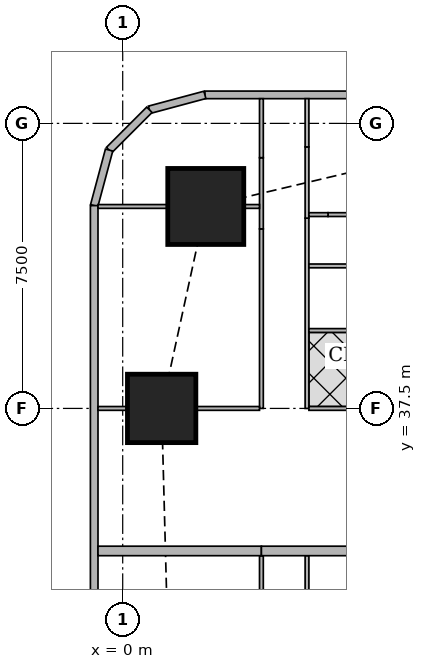
"""IFC4 building model, lengths in metres.
Left out: names, types, materials, properties, quantities, classifications, styles, units other than length and angle.
Written with IfcOpenShell. Run it as: python <this file> out.ifc"""

import sys

from ifc_helpers import new_model, si_unit, direction, frame, frame_2d, origin, origin_2d, place, context, subcontext, project, spatial, rectangle, extrude, element, fill, save


model = new_model("IFC4")
c1 = context("Model", 3, precision=1e-05, world=origin(), true_north=direction((0.0, 1.0)))
c2 = subcontext(c1, "Body", "Model", "MODEL_VIEW")
j1 = project(units=[si_unit("LENGTHUNIT", "METRE"), si_unit("PLANEANGLEUNIT", "RADIAN")], contexts=[c1])
p1 = place(None, origin())
s1 = spatial("IfcSite", under=j1, at=p1, CompositionType="ELEMENT")
p2 = place(p1, origin())
s2 = spatial("IfcBuilding", under=s1, at=p2, CompositionType="ELEMENT")
p3 = place(p2, frame((0.0, 0.0, 180.8)))
s3 = spatial("IfcBuildingStorey", under=s2, at=p3, CompositionType="ELEMENT", Elevation=180.8)
p4 = place(p3, frame((1.025, 37.5, 0.0), z_axis=(0.0, 0.0, 1.0), x_axis=(1.0, 0.0, 0.0)))
e1 = element("IfcColumn", 1, at=p4, inside=s3, PredefinedType="COLUMN", context=c2, shape_type="SweptSolid", body=[
    extrude(rectangle(XDim=1.8, YDim=1.8, at=origin_2d()), origin(), (0.0, 0.0, 1.0), 3.75),
])
p5 = place(p3, frame((2.186, 42.814, 0.0), z_axis=(0.0, 0.0, 1.0), x_axis=(1.0, 0.0, 0.0)))
e2 = element("IfcColumn", 2, at=p5, inside=s3, PredefinedType="COLUMN", context=c2, shape_type="SweptSolid", body=[
    extrude(rectangle(XDim=2.0, YDim=2.0, at=origin_2d()), origin(), (0.0, 0.0, 1.0), 3.75),
])
p6 = place(p3, frame((40.106, 45.75, 0.0), z_axis=(0.0, 0.0, 1.0), x_axis=(-1.0, 0.0, 0.0)))
e3 = element("IfcWall", 3, at=p6, inside=s3, PredefinedType="SOLIDWALL", context=c2, shape_type="SweptSolid", body=[
    extrude(rectangle(XDim=37.943, YDim=0.2, at=frame_2d((18.971, 0.0))), origin(), (0.0, 0.0, 1.0), 3.5),
])
p7 = place(p6, frame((8.606, 0.0, 0.9)))
e4 = element("IfcOpeningElement", 4, at=p7, cuts=e3, PredefinedType="OPENING", context=c2, shape_type="SweptSolid", body=[
    extrude(rectangle(XDim=1.8, YDim=1.5, at=frame_2d((0.9, 0.75))), frame((0.0, 0.11, 0.0), z_axis=(0.0, -1.0, 0.0), x_axis=(1.0, 0.0, 0.0)), (0.0, 0.0, 1.0), 0.22),
])
p8 = place(p6, frame((12.206, 0.0, 0.9)))
e5 = element("IfcOpeningElement", 5, at=p8, cuts=e3, PredefinedType="OPENING", context=c2, shape_type="SweptSolid", body=[
    extrude(rectangle(XDim=1.8, YDim=1.5, at=frame_2d((0.9, 0.75))), frame((0.0, 0.11, 0.0), z_axis=(0.0, -1.0, 0.0), x_axis=(1.0, 0.0, 0.0)), (0.0, 0.0, 1.0), 0.22),
])
p9 = place(p6, frame((15.806, 0.0, 0.9)))
e6 = element("IfcOpeningElement", 6, at=p9, cuts=e3, PredefinedType="OPENING", context=c2, shape_type="SweptSolid", body=[
    extrude(rectangle(XDim=1.8, YDim=1.5, at=frame_2d((0.9, 0.75))), frame((0.0, 0.11, 0.0), z_axis=(0.0, -1.0, 0.0), x_axis=(1.0, 0.0, 0.0)), (0.0, 0.0, 1.0), 0.22),
])
p10 = place(p6, frame((19.406, 0.0, 0.9)))
e7 = element("IfcOpeningElement", 7, at=p10, cuts=e3, PredefinedType="OPENING", context=c2, shape_type="SweptSolid", body=[
    extrude(rectangle(XDim=1.8, YDim=1.5, at=frame_2d((0.9, 0.75))), frame((0.0, 0.11, 0.0), z_axis=(0.0, -1.0, 0.0), x_axis=(1.0, 0.0, 0.0)), (0.0, 0.0, 1.0), 0.22),
])
p11 = place(p6, frame((23.006, 0.0, 0.9)))
e8 = element("IfcOpeningElement", 8, at=p11, cuts=e3, PredefinedType="OPENING", context=c2, shape_type="SweptSolid", body=[
    extrude(rectangle(XDim=1.8, YDim=1.5, at=frame_2d((0.9, 0.75))), frame((0.0, 0.11, 0.0), z_axis=(0.0, -1.0, 0.0), x_axis=(1.0, 0.0, 0.0)), (0.0, 0.0, 1.0), 0.22),
])
p12 = place(p6, frame((26.606, 0.0, 0.9)))
e9 = element("IfcOpeningElement", 9, at=p12, cuts=e3, PredefinedType="OPENING", context=c2, shape_type="SweptSolid", body=[
    extrude(rectangle(XDim=1.8, YDim=1.5, at=frame_2d((0.9, 0.75))), frame((0.0, 0.11, 0.0), z_axis=(0.0, -1.0, 0.0), x_axis=(1.0, 0.0, 0.0)), (0.0, 0.0, 1.0), 0.22),
])
p13 = place(p3, frame((2.163, 45.75, 0.0), z_axis=(0.0, 0.0, 1.0), x_axis=(-0.965832000415, -0.259168954497, 0.0)))
e10 = element("IfcWall", 10, at=p13, inside=s3, PredefinedType="SOLIDWALL", context=c2, shape_type="SweptSolid", body=[
    extrude(rectangle(XDim=1.513, YDim=0.2, at=frame_2d((0.756, 0.0))), origin(), (0.0, 0.0, 1.0), 3.5),
])
p14 = place(p3, frame((0.702, 45.358, 0.0), z_axis=(0.0, 0.0, 1.0), x_axis=(-0.707106781187, -0.707106781187, 0.0)))
e11 = element("IfcWall", 11, at=p14, inside=s3, PredefinedType="SOLIDWALL", context=c2, shape_type="SweptSolid", body=[
    extrude(rectangle(XDim=1.499, YDim=0.2, at=frame_2d((0.75, 0.0))), origin(), (0.0, 0.0, 1.0), 3.5),
])
p15 = place(p3, frame((-0.358, 44.298, 0.0), z_axis=(0.0, 0.0, 1.0), x_axis=(-0.259168954497, -0.965832000415, 0.0)))
e12 = element("IfcWall", 12, at=p15, inside=s3, PredefinedType="SOLIDWALL", context=c2, shape_type="SweptSolid", body=[
    extrude(rectangle(XDim=1.513, YDim=0.2, at=frame_2d((0.756, 0.0))), origin(), (0.0, 0.0, 1.0), 3.5),
])
p16 = place(p3, frame((-0.75, 42.837, 0.0), z_axis=(0.0, 0.0, 1.0), x_axis=(0.0, -1.0, 0.0)))
e13 = element("IfcWall", 13, at=p16, inside=s3, PredefinedType="SOLIDWALL", context=c2, shape_type="SweptSolid", body=[
    extrude(rectangle(XDim=40.674, YDim=0.2, at=frame_2d((20.337, 0.0))), origin(), (0.0, 0.0, 1.0), 3.5),
])
p17 = place(p16, frame((1.78, 0.0, 0.9)))
e14 = element("IfcOpeningElement", 14, at=p17, cuts=e13, PredefinedType="OPENING", context=c2, shape_type="SweptSolid", body=[
    extrude(rectangle(XDim=1.8, YDim=1.5, at=frame_2d((0.9, 0.75))), frame((0.0, 0.11, 0.0), z_axis=(0.0, -1.0, 0.0), x_axis=(1.0, 0.0, 0.0)), (0.0, 0.0, 1.0), 0.22),
])
p18 = place(p16, frame((6.312, 0.0, 0.9)))
e15 = element("IfcOpeningElement", 15, at=p18, cuts=e13, PredefinedType="OPENING", context=c2, shape_type="SweptSolid", body=[
    extrude(rectangle(XDim=1.8, YDim=1.5, at=frame_2d((0.9, 0.75))), frame((0.0, 0.11, 0.0), z_axis=(0.0, -1.0, 0.0), x_axis=(1.0, 0.0, 0.0)), (0.0, 0.0, 1.0), 0.22),
])
p19 = place(p16, frame((10.062, 0.0, 0.9)))
e16 = element("IfcOpeningElement", 16, at=p19, cuts=e13, PredefinedType="OPENING", context=c2, shape_type="SweptSolid", body=[
    extrude(rectangle(XDim=1.8, YDim=1.5, at=frame_2d((0.9, 0.75))), frame((0.0, 0.11, 0.0), z_axis=(0.0, -1.0, 0.0), x_axis=(1.0, 0.0, 0.0)), (0.0, 0.0, 1.0), 0.22),
])
p20 = place(p16, frame((13.812, 0.0, 0.9)))
e17 = element("IfcOpeningElement", 17, at=p20, cuts=e13, PredefinedType="OPENING", context=c2, shape_type="SweptSolid", body=[
    extrude(rectangle(XDim=1.8, YDim=1.5, at=frame_2d((0.9, 0.75))), frame((0.0, 0.11, 0.0), z_axis=(0.0, -1.0, 0.0), x_axis=(1.0, 0.0, 0.0)), (0.0, 0.0, 1.0), 0.22),
])
p21 = place(p16, frame((17.562, 0.0, 0.9)))
e18 = element("IfcOpeningElement", 18, at=p21, cuts=e13, PredefinedType="OPENING", context=c2, shape_type="SweptSolid", body=[
    extrude(rectangle(XDim=1.8, YDim=1.5, at=frame_2d((0.9, 0.75))), frame((0.0, 0.11, 0.0), z_axis=(0.0, -1.0, 0.0), x_axis=(1.0, 0.0, 0.0)), (0.0, 0.0, 1.0), 0.22),
])
p22 = place(p16, frame((21.312, 0.0, 0.9)))
e19 = element("IfcOpeningElement", 19, at=p22, cuts=e13, PredefinedType="OPENING", context=c2, shape_type="SweptSolid", body=[
    extrude(rectangle(XDim=1.8, YDim=1.5, at=frame_2d((0.9, 0.75))), frame((0.0, 0.11, 0.0), z_axis=(0.0, -1.0, 0.0), x_axis=(1.0, 0.0, 0.0)), (0.0, 0.0, 1.0), 0.22),
])
p23 = place(p16, frame((25.062, 0.0, 0.9)))
e20 = element("IfcOpeningElement", 20, at=p23, cuts=e13, PredefinedType="OPENING", context=c2, shape_type="SweptSolid", body=[
    extrude(rectangle(XDim=1.8, YDim=1.5, at=frame_2d((0.9, 0.75))), frame((0.0, 0.11, 0.0), z_axis=(0.0, -1.0, 0.0), x_axis=(1.0, 0.0, 0.0)), (0.0, 0.0, 1.0), 0.22),
])
p24 = place(p16, frame((28.812, 0.0, 0.9)))
e21 = element("IfcOpeningElement", 21, at=p24, cuts=e13, PredefinedType="OPENING", context=c2, shape_type="SweptSolid", body=[
    extrude(rectangle(XDim=1.8, YDim=1.5, at=frame_2d((0.9, 0.75))), frame((0.0, 0.11, 0.0), z_axis=(0.0, -1.0, 0.0), x_axis=(1.0, 0.0, 0.0)), (0.0, 0.0, 1.0), 0.22),
])
p25 = place(p16, frame((32.562, 0.0, 0.9)))
e22 = element("IfcOpeningElement", 22, at=p25, cuts=e13, PredefinedType="OPENING", context=c2, shape_type="SweptSolid", body=[
    extrude(rectangle(XDim=1.8, YDim=1.5, at=frame_2d((0.9, 0.75))), frame((0.0, 0.11, 0.0), z_axis=(0.0, -1.0, 0.0), x_axis=(1.0, 0.0, 0.0)), (0.0, 0.0, 1.0), 0.22),
])
p26 = place(p16, frame((37.094, 0.0, 0.9)))
e23 = element("IfcOpeningElement", 23, at=p26, cuts=e13, PredefinedType="OPENING", context=c2, shape_type="SweptSolid", body=[
    extrude(rectangle(XDim=1.8, YDim=1.5, at=frame_2d((0.9, 0.75))), frame((0.0, 0.11, 0.0), z_axis=(0.0, -1.0, 0.0), x_axis=(1.0, 0.0, 0.0)), (0.0, 0.0, 1.0), 0.22),
])
p27 = place(p3, frame((3.65, 26.25, 0.0), z_axis=(0.0, 0.0, 1.0), x_axis=(0.0, 1.0, 0.0)))
e24 = element("IfcWall", 24, at=p27, inside=s3, PredefinedType="PARTITIONING", context=c2, shape_type="SweptSolid", body=[
    extrude(rectangle(XDim=7.375, YDim=0.1, at=frame_2d((3.688, 0.0))), origin(), (0.0, 0.0, 1.0), 3.5),
])
p28 = place(p27, frame((0.2, 0.0, 0.0)))
e25 = element("IfcOpeningElement", 25, at=p28, cuts=e24, PredefinedType="OPENING", context=c2, shape_type="SweptSolid", body=[
    extrude(rectangle(XDim=0.9, YDim=2.1, at=frame_2d((0.45, 1.05))), frame((0.0, 0.06, 0.0), z_axis=(0.0, -1.0, 0.0), x_axis=(1.0, 0.0, 0.0)), (0.0, 0.0, 1.0), 0.12),
])
p29 = place(p27, frame((3.95, 0.0, 0.0)))
e26 = element("IfcOpeningElement", 26, at=p29, cuts=e24, PredefinedType="OPENING", context=c2, shape_type="SweptSolid", body=[
    extrude(rectangle(XDim=0.9, YDim=2.1, at=frame_2d((0.45, 1.05))), frame((0.0, 0.06, 0.0), z_axis=(0.0, -1.0, 0.0), x_axis=(1.0, 0.0, 0.0)), (0.0, 0.0, 1.0), 0.12),
])
p30 = place(p3, frame((4.85, 26.25, 0.0), z_axis=(0.0, 0.0, 1.0), x_axis=(0.0, 1.0, 0.0)))
e27 = element("IfcWall", 27, at=p30, inside=s3, PredefinedType="PARTITIONING", context=c2, shape_type="SweptSolid", body=[
    extrude(rectangle(XDim=7.375, YDim=0.1, at=frame_2d((3.688, 0.0))), origin(), (0.0, 0.0, 1.0), 3.5),
])
p31 = place(p30, frame((0.575, 0.0, 0.0)))
e28 = element("IfcOpeningElement", 28, at=p31, cuts=e27, PredefinedType="OPENING", context=c2, shape_type="SweptSolid", body=[
    extrude(rectangle(XDim=0.9, YDim=2.1, at=frame_2d((0.45, 1.05))), frame((0.0, 0.06, 0.0), z_axis=(0.0, -1.0, 0.0), x_axis=(1.0, 0.0, 0.0)), (0.0, 0.0, 1.0), 0.12),
])
p32 = place(p30, frame((4.1, 0.0, 0.0)))
e29 = element("IfcOpeningElement", 29, at=p32, cuts=e27, PredefinedType="OPENING", context=c2, shape_type="SweptSolid", body=[
    extrude(rectangle(XDim=0.9, YDim=2.1, at=frame_2d((0.45, 1.05))), frame((0.0, 0.06, 0.0), z_axis=(0.0, -1.0, 0.0), x_axis=(1.0, 0.0, 0.0)), (0.0, 0.0, 1.0), 0.12),
])
p33 = place(p30, frame((2.45, 0.0, 0.0)))
e30 = element("IfcOpeningElement", 30, at=p33, cuts=e27, PredefinedType="OPENING", context=c2, shape_type="SweptSolid", body=[
    extrude(rectangle(XDim=0.9, YDim=2.1, at=frame_2d((0.45, 1.05))), frame((0.0, 0.06, 0.0), z_axis=(0.0, -1.0, 0.0), x_axis=(1.0, 0.0, 0.0)), (0.0, 0.0, 1.0), 0.12),
])
p34 = place(p30, frame((5.975, 0.0, 0.0)))
e31 = element("IfcOpeningElement", 31, at=p34, cuts=e27, PredefinedType="OPENING", context=c2, shape_type="SweptSolid", body=[
    extrude(rectangle(XDim=0.9, YDim=2.1, at=frame_2d((0.45, 1.05))), frame((0.0, 0.06, 0.0), z_axis=(0.0, -1.0, 0.0), x_axis=(1.0, 0.0, 0.0)), (0.0, 0.0, 1.0), 0.12),
])
p35 = place(p3, frame((3.65, 37.5, 0.0), z_axis=(0.0, 0.0, 1.0), x_axis=(0.0, 1.0, 0.0)))
e32 = element("IfcWall", 32, at=p35, inside=s3, PredefinedType="PARTITIONING", context=c2, shape_type="SweptSolid", body=[
    extrude(rectangle(XDim=4.724, YDim=0.1, at=frame_2d((2.362, 0.0))), origin(), (0.0, 0.0, 1.0), 3.5),
])
p36 = place(p35, frame((0.2, 0.0, 0.0)))
e33 = element("IfcOpeningElement", 33, at=p36, cuts=e32, PredefinedType="OPENING", context=c2, shape_type="SweptSolid", body=[
    extrude(rectangle(XDim=0.9, YDim=2.1, at=frame_2d((0.45, 1.05))), frame((0.0, 0.06, 0.0), z_axis=(0.0, -1.0, 0.0), x_axis=(1.0, 0.0, 0.0)), (0.0, 0.0, 1.0), 0.12),
])
p37 = place(p3, frame((3.65, 42.224, 0.0), z_axis=(0.0, 0.0, 1.0), x_axis=(0.0, 1.0, 0.0)))
e34 = element("IfcWall", 34, at=p37, inside=s3, PredefinedType="PARTITIONING", context=c2, shape_type="SweptSolid", body=[
    extrude(rectangle(XDim=1.873, YDim=0.1, at=frame_2d((0.937, 0.0))), origin(), (0.0, 0.0, 1.0), 2.1),
])
p38 = place(p3, frame((3.65, 44.097, 0.0), z_axis=(0.0, 0.0, 1.0), x_axis=(0.0, 1.0, 0.0)))
e35 = element("IfcWall", 35, at=p38, inside=s3, PredefinedType="PARTITIONING", context=c2, shape_type="SweptSolid", body=[
    extrude(rectangle(XDim=1.553, YDim=0.1, at=frame_2d((0.776, 0.0))), origin(), (0.0, 0.0, 1.0), 3.5),
])
p39 = place(p3, frame((4.85, 37.5, 0.0), z_axis=(0.0, 0.0, 1.0), x_axis=(0.0, 1.0, 0.0)))
e36 = element("IfcWall", 36, at=p39, inside=s3, PredefinedType="PARTITIONING", context=c2, shape_type="SweptSolid", body=[
    extrude(rectangle(XDim=5.007, YDim=0.1, at=frame_2d((2.503, 0.0))), origin(), (0.0, 0.0, 1.0), 3.5),
])
p40 = place(p39, frame((0.575, 0.0, 0.0)))
e37 = element("IfcOpeningElement", 37, at=p40, cuts=e36, PredefinedType="OPENING", context=c2, shape_type="SweptSolid", body=[
    extrude(rectangle(XDim=0.9, YDim=2.1, at=frame_2d((0.45, 1.05))), frame((0.0, 0.06, 0.0), z_axis=(0.0, -1.0, 0.0), x_axis=(1.0, 0.0, 0.0)), (0.0, 0.0, 1.0), 0.12),
])
p41 = place(p39, frame((2.45, 0.0, 0.0)))
e38 = element("IfcOpeningElement", 38, at=p41, cuts=e36, PredefinedType="OPENING", context=c2, shape_type="SweptSolid", body=[
    extrude(rectangle(XDim=0.9, YDim=2.1, at=frame_2d((0.45, 1.05))), frame((0.0, 0.06, 0.0), z_axis=(0.0, -1.0, 0.0), x_axis=(1.0, 0.0, 0.0)), (0.0, 0.0, 1.0), 0.12),
])
p42 = place(p3, frame((4.85, 42.507, 0.0), z_axis=(0.0, 0.0, 1.0), x_axis=(0.0, 1.0, 0.0)))
e39 = element("IfcWall", 39, at=p42, inside=s3, PredefinedType="PARTITIONING", context=c2, shape_type="SweptSolid", body=[
    extrude(rectangle(XDim=1.874, YDim=0.1, at=frame_2d((0.937, 0.0))), origin(), (0.0, 0.0, 1.0), 2.1),
])
p43 = place(p3, frame((4.85, 44.381, 0.0), z_axis=(0.0, 0.0, 1.0), x_axis=(0.0, 1.0, 0.0)))
e40 = element("IfcWall", 40, at=p43, inside=s3, PredefinedType="PARTITIONING", context=c2, shape_type="SweptSolid", body=[
    extrude(rectangle(XDim=1.269, YDim=0.1, at=frame_2d((0.634, 0.0))), origin(), (0.0, 0.0, 1.0), 3.5),
])
p44 = place(p43, frame((0.15, 0.0, 0.0)))
e41 = element("IfcOpeningElement", 41, at=p44, cuts=e40, PredefinedType="OPENING", context=c2, shape_type="SweptSolid", body=[
    extrude(rectangle(XDim=0.9, YDim=2.1, at=frame_2d((0.45, 1.05))), frame((0.0, 0.06, 0.0), z_axis=(0.0, -1.0, 0.0), x_axis=(1.0, 0.0, 0.0)), (0.0, 0.0, 1.0), 0.12),
])
p45 = place(p3, frame((-0.65, 37.5, 0.0), z_axis=(0.0, 0.0, 1.0), x_axis=(1.0, 0.0, 0.0)))
e42 = element("IfcWall", 42, at=p45, inside=s3, PredefinedType="PARTITIONING", context=c2, shape_type="SweptSolid", body=[
    extrude(rectangle(XDim=0.774, YDim=0.1, at=frame_2d((0.387, 0.0))), origin(), (0.0, 0.0, 1.0), 3.5),
])
p46 = place(p3, frame((1.926, 37.5, 0.0), z_axis=(0.0, 0.0, 1.0), x_axis=(1.0, 0.0, 0.0)))
e43 = element("IfcWall", 43, at=p46, inside=s3, PredefinedType="PARTITIONING", context=c2, shape_type="SweptSolid", body=[
    extrude(rectangle(XDim=1.674, YDim=0.1, at=frame_2d((0.837, 0.0))), origin(), (0.0, 0.0, 1.0), 2.1),
])
p47 = place(p3, frame((-0.65, 42.814, 0.0), z_axis=(0.0, 0.0, 1.0), x_axis=(1.0, 0.0, 0.0)))
e44 = element("IfcWall", 44, at=p47, inside=s3, PredefinedType="PARTITIONING", context=c2, shape_type="SweptSolid", body=[
    extrude(rectangle(XDim=1.835, YDim=0.1, at=frame_2d((0.917, 0.0))), origin(), (0.0, 0.0, 1.0), 3.5),
])
p48 = place(p3, frame((3.187, 42.814, 0.0), z_axis=(0.0, 0.0, 1.0), x_axis=(1.0, 0.0, 0.0)))
e45 = element("IfcWall", 45, at=p48, inside=s3, PredefinedType="PARTITIONING", context=c2, shape_type="SweptSolid", body=[
    extrude(rectangle(XDim=0.413, YDim=0.1, at=frame_2d((0.207, 0.0))), origin(), (0.0, 0.0, 1.0), 2.1),
])
p49 = place(p3, frame((4.9, 37.5, 0.0), z_axis=(0.0, 0.0, 1.0), x_axis=(1.0, 0.0, 0.0)))
e46 = element("IfcWall", 46, at=p49, inside=s3, PredefinedType="PARTITIONING", context=c2, shape_type="SweptSolid", body=[
    extrude(rectangle(XDim=1.549, YDim=0.1, at=frame_2d((0.774, 0.0))), origin(), (0.0, 0.0, 1.0), 3.5),
])
for number, where, z_axis, x_axis in (
    (47, (4.9, 41.25, 0.0), (0.0, 0.0, 1.0), (1.0, 0.0, 0.0)),
    (48, (4.9, 39.55, 0.0), (0.0, 0.0, 1.0), (1.0, 0.0, 0.0)),
):
    element("IfcWall", number, at=place(p3, frame(where, z_axis=z_axis, x_axis=x_axis)), inside=s3, PredefinedType="PARTITIONING", context=c2, shape_type="SweptSolid", body=[
        extrude(rectangle(XDim=3.525, YDim=0.1, at=frame_2d((1.763, 0.0))), origin(), (0.0, 0.0, 1.0), 3.5),
    ])
p50 = place(p3, frame((-0.65, 33.75, 0.0), z_axis=(0.0, 0.0, 1.0), x_axis=(1.0, 0.0, 0.0)))
e49 = element("IfcWall", 49, at=p50, inside=s3, PredefinedType="SOLIDWALL", context=c2, shape_type="SweptSolid", body=[
    extrude(rectangle(XDim=4.3, YDim=0.25, at=frame_2d((2.15, 0.0))), origin(), (0.0, 0.0, 1.0), 2.1),
])
p51 = place(p3, frame((3.65, 33.75, 0.0), z_axis=(0.0, 0.0, 1.0), x_axis=(1.0, 0.0, 0.0)))
e50 = element("IfcWall", 50, at=p51, inside=s3, PredefinedType="SOLIDWALL", context=c2, shape_type="SweptSolid", body=[
    extrude(rectangle(XDim=4.775, YDim=0.25, at=frame_2d((2.388, 0.0))), origin(), (0.0, 0.0, 1.0), 3.5),
])
p52 = place(p3, frame((8.425, 42.6, 0.0), z_axis=(0.0, 0.0, 1.0), x_axis=(-1.0, 0.0, 0.0)))
e51 = element("IfcWall", 51, at=p52, inside=s3, PredefinedType="PARTITIONING", context=c2, shape_type="SweptSolid", body=[
    extrude(rectangle(XDim=3.022, YDim=0.1, at=frame_2d((1.511, 0.0))), origin(), (0.0, 0.0, 1.0), 3.5),
])
p53 = place(p52, frame((1.95, 0.0, 0.0)))
e52 = element("IfcOpeningElement", 52, at=p53, cuts=e51, PredefinedType="OPENING", context=c2, shape_type="SweptSolid", body=[
    extrude(rectangle(XDim=0.9, YDim=2.1, at=frame_2d((0.45, 1.05))), frame((0.0, 0.06, 0.0), z_axis=(0.0, -1.0, 0.0), x_axis=(1.0, 0.0, 0.0)), (0.0, 0.0, 1.0), 0.12),
])
p54 = place(p3, frame((5.403, 42.6, 0.0), z_axis=(0.0, 0.0, 1.0), x_axis=(-1.0, 0.0, 0.0)))
e53 = element("IfcWall", 53, at=p54, inside=s3, PredefinedType="PARTITIONING", context=c2, shape_type="SweptSolid", body=[
    extrude(rectangle(XDim=0.503, YDim=0.1, at=frame_2d((0.251, 0.0))), origin(), (0.0, 0.0, 1.0), 2.1),
])
p55 = place(p17, origin())
e54 = element("IfcWindow", 54, at=p55, inside=s3, PartitioningType="SINGLE_PANEL", PredefinedType="WINDOW", context=c2, shape_type="SweptSolid", body=[
    extrude(rectangle(XDim=1.8, YDim=1.5, at=frame_2d((0.9, 0.75))), frame((0.0, 0.03, 0.0), z_axis=(0.0, -1.0, 0.0), x_axis=(1.0, 0.0, 0.0)), (0.0, 0.0, 1.0), 0.06),
])
fill(e14, e54)
p56 = place(p18, origin())
e55 = element("IfcWindow", 55, at=p56, inside=s3, PartitioningType="SINGLE_PANEL", PredefinedType="WINDOW", context=c2, shape_type="SweptSolid", body=[
    extrude(rectangle(XDim=1.8, YDim=1.5, at=frame_2d((0.9, 0.75))), frame((0.0, 0.03, 0.0), z_axis=(0.0, -1.0, 0.0), x_axis=(1.0, 0.0, 0.0)), (0.0, 0.0, 1.0), 0.06),
])
fill(e15, e55)
p57 = place(p19, origin())
e56 = element("IfcWindow", 56, at=p57, inside=s3, PartitioningType="SINGLE_PANEL", PredefinedType="WINDOW", context=c2, shape_type="SweptSolid", body=[
    extrude(rectangle(XDim=1.8, YDim=1.5, at=frame_2d((0.9, 0.75))), frame((0.0, 0.03, 0.0), z_axis=(0.0, -1.0, 0.0), x_axis=(1.0, 0.0, 0.0)), (0.0, 0.0, 1.0), 0.06),
])
fill(e16, e56)
p58 = place(p34, origin())
e57 = element("IfcDoor", 57, at=p58, inside=s3, OperationType="SINGLE_SWING_LEFT", PredefinedType="DOOR", context=c2, shape_type="SweptSolid", body=[
    extrude(rectangle(XDim=0.9, YDim=2.1, at=frame_2d((0.45, 1.05))), frame((0.0, 0.025, 0.0), z_axis=(0.0, -1.0, 0.0), x_axis=(1.0, 0.0, 0.0)), (0.0, 0.0, 1.0), 0.05),
])
fill(e31, e57)
p59 = place(p36, origin())
e58 = element("IfcDoor", 58, at=p59, inside=s3, OperationType="SINGLE_SWING_LEFT", PredefinedType="DOOR", context=c2, shape_type="SweptSolid", body=[
    extrude(rectangle(XDim=0.9, YDim=2.1, at=frame_2d((0.45, 1.05))), frame((0.0, 0.025, 0.0), z_axis=(0.0, -1.0, 0.0), x_axis=(1.0, 0.0, 0.0)), (0.0, 0.0, 1.0), 0.05),
])
fill(e33, e58)
p60 = place(p40, origin())
e59 = element("IfcDoor", 59, at=p60, inside=s3, OperationType="SINGLE_SWING_RIGHT", PredefinedType="DOOR", context=c2, shape_type="SweptSolid", body=[
    extrude(rectangle(XDim=0.9, YDim=2.1, at=frame_2d((0.45, 1.05))), frame((0.0, 0.025, 0.0), z_axis=(0.0, -1.0, 0.0), x_axis=(1.0, 0.0, 0.0)), (0.0, 0.0, 1.0), 0.05),
])
fill(e37, e59)
p61 = place(p44, origin())
e60 = element("IfcDoor", 60, at=p61, inside=s3, OperationType="SINGLE_SWING_RIGHT", PredefinedType="DOOR", context=c2, shape_type="SweptSolid", body=[
    extrude(rectangle(XDim=0.9, YDim=2.1, at=frame_2d((0.45, 1.05))), frame((0.0, 0.025, 0.0), z_axis=(0.0, -1.0, 0.0), x_axis=(1.0, 0.0, 0.0)), (0.0, 0.0, 1.0), 0.05),
])
fill(e41, e60)
p62 = place(p41, origin())
e61 = element("IfcDoor", 61, at=p62, inside=s3, OperationType="SINGLE_SWING_LEFT", PredefinedType="DOOR", context=c2, shape_type="SweptSolid", body=[
    extrude(rectangle(XDim=0.9, YDim=2.1, at=frame_2d((0.45, 1.05))), frame((0.0, 0.025, 0.0), z_axis=(0.0, -1.0, 0.0), x_axis=(1.0, 0.0, 0.0)), (0.0, 0.0, 1.0), 0.05),
])
fill(e38, e61)
p63 = place(p53, origin())
e62 = element("IfcDoor", 62, at=p63, inside=s3, OperationType="SINGLE_SWING_RIGHT", PredefinedType="DOOR", context=c2, shape_type="SweptSolid", body=[
    extrude(rectangle(XDim=0.9, YDim=2.1, at=frame_2d((0.45, 1.05))), frame((0.0, 0.025, 0.0), z_axis=(0.0, -1.0, 0.0), x_axis=(1.0, 0.0, 0.0)), (0.0, 0.0, 1.0), 0.05),
])
fill(e52, e62)
save(model, sys.argv[1])
